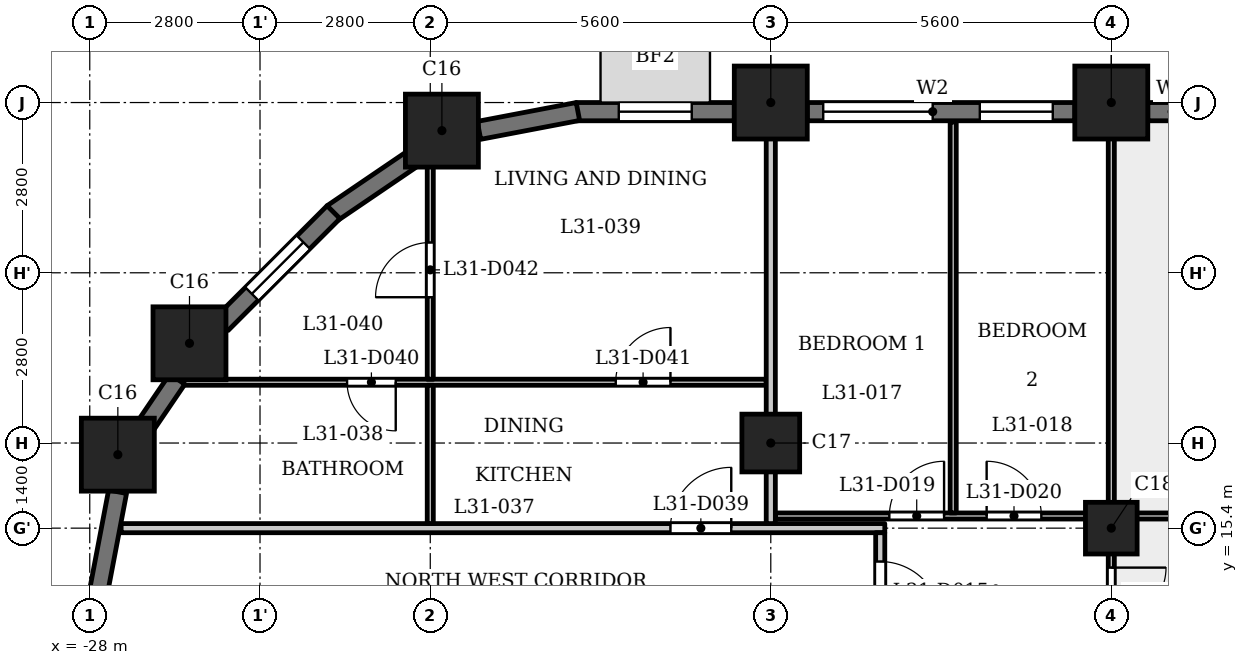
"""IFC4 building model, lengths in metres.
Left out: names, types, materials, properties, quantities, classifications, styles, units other than length and angle.
Written with IfcOpenShell. Run it as: python <this file> out.ifc"""

import sys

from ifc_helpers import new_model, si_unit, direction, frame, frame_2d, origin, origin_2d, place, context, subcontext, project, spatial, rectangle, extrude, element, fill, save


model = new_model("IFC4")
c1 = context("Model", 3, precision=1e-05, world=origin(), true_north=direction((0.0, 1.0)))
c2 = subcontext(c1, "Body", "Model", "MODEL_VIEW")
j1 = project(units=[si_unit("LENGTHUNIT", "METRE"), si_unit("PLANEANGLEUNIT", "RADIAN")], contexts=[c1])
p1 = place(None, origin())
s1 = spatial("IfcSite", under=j1, at=p1, CompositionType="ELEMENT")
p2 = place(p1, origin())
s2 = spatial("IfcBuilding", under=s1, at=p2, CompositionType="ELEMENT")
p3 = place(p2, frame((0.0, 0.0, 121.8)))
s3 = spatial("IfcBuildingStorey", under=s2, at=p3, CompositionType="ELEMENT", Elevation=121.8)
for number, where, z_axis, x_axis in (
    (1, (-11.2, 22.4, 0.0), (0.0, 0.0, 1.0), (1.0, 0.0, 0.0)),
    (2, (-16.8, 22.4, 0.0), (0.0, 0.0, 1.0), (1.0, 0.0, 0.0)),
    (3, (-22.209, 21.938, 0.0), (0.0, 0.0, 1.0), (1.0, 0.0, 0.0)),
    (4, (-26.36, 18.44, 0.0), (0.0, 0.0, 1.0), (1.0, 0.0, 0.0)),
    (5, (-27.538, 16.609, 0.0), (0.0, 0.0, 1.0), (1.0, 0.0, 0.0)),
):
    element("IfcColumn", number, at=place(p3, frame(where, z_axis=z_axis, x_axis=x_axis)), inside=s3, PredefinedType="COLUMN", context=c2, shape_type="SweptSolid", body=[
        extrude(rectangle(XDim=1.2, YDim=1.2, at=origin_2d()), origin(), (0.0, 0.0, 1.0), 3.5),
    ])
p4 = place(p3, frame((-16.8, 16.8, 0.0), z_axis=(0.0, 0.0, 1.0), x_axis=(1.0, 0.0, 0.0)))
e6 = element("IfcColumn", 6, at=p4, inside=s3, PredefinedType="COLUMN", context=c2, shape_type="SweptSolid", body=[
    extrude(rectangle(XDim=0.95, YDim=0.95, at=origin_2d()), origin(), (0.0, 0.0, 1.0), 3.5),
])
p5 = place(p3, frame((-11.2, 15.4, 0.0), z_axis=(0.0, 0.0, 1.0), x_axis=(1.0, 0.0, 0.0)))
e7 = element("IfcColumn", 7, at=p5, inside=s3, PredefinedType="COLUMN", context=c2, shape_type="SweptSolid", body=[
    extrude(rectangle(XDim=0.85, YDim=0.85, at=origin_2d()), origin(), (0.0, 0.0, 1.0), 3.5),
])
p6 = place(p3, frame((-6.2, 22.25, 0.0), z_axis=(0.0, 0.0, 1.0), x_axis=(-1.0, 0.0, 0.0)))
e8 = element("IfcWall", 8, at=p6, inside=s3, PredefinedType="SOLIDWALL", context=c2, shape_type="SweptSolid", body=[
    extrude(rectangle(XDim=4.4, YDim=0.3, at=frame_2d((2.2, 0.0))), origin(), (0.0, 0.0, 1.0), 2.35),
])
p7 = place(p6, frame((0.4, 0.0, 1.2)))
e9 = element("IfcOpeningElement", 9, at=p7, cuts=e8, PredefinedType="OPENING", context=c2, shape_type="SweptSolid", body=[
    extrude(rectangle(XDim=3.6, YDim=0.95, at=frame_2d((1.8, 0.475))), frame((0.0, 0.16, 0.0), z_axis=(0.0, -1.0, 0.0), x_axis=(1.0, 0.0, 0.0)), (0.0, 0.0, 1.0), 0.32),
])
p8 = place(p3, frame((-11.8, 22.25, 0.0), z_axis=(0.0, 0.0, 1.0), x_axis=(-1.0, 0.0, 0.0)))
e10 = element("IfcWall", 10, at=p8, inside=s3, PredefinedType="SOLIDWALL", context=c2, shape_type="SweptSolid", body=[
    extrude(rectangle(XDim=4.4, YDim=0.3, at=frame_2d((2.2, 0.0))), origin(), (0.0, 0.0, 1.0), 2.35),
])
p9 = place(p8, frame((0.363, 0.0, 0.6)))
e11 = element("IfcOpeningElement", 11, at=p9, cuts=e10, PredefinedType="OPENING", context=c2, shape_type="SweptSolid", body=[
    extrude(rectangle(XDim=1.2, YDim=1.55, at=frame_2d((0.6, 0.775))), frame((0.0, 0.16, 0.0), z_axis=(0.0, -1.0, 0.0), x_axis=(1.0, 0.0, 0.0)), (0.0, 0.0, 1.0), 0.32),
])
p10 = place(p8, frame((2.337, 0.0, 0.9)))
e12 = element("IfcOpeningElement", 12, at=p10, cuts=e10, PredefinedType="OPENING", context=c2, shape_type="SweptSolid", body=[
    extrude(rectangle(XDim=1.8, YDim=1.25, at=frame_2d((0.9, 0.625))), frame((0.0, 0.16, 0.0), z_axis=(0.0, -1.0, 0.0), x_axis=(1.0, 0.0, 0.0)), (0.0, 0.0, 1.0), 0.32),
])
p11 = place(p3, frame((-17.4, 22.25, 0.0), z_axis=(0.0, 0.0, 1.0), x_axis=(-1.0, 0.0, 0.0)))
e13 = element("IfcWall", 13, at=p11, inside=s3, PredefinedType="SOLIDWALL", context=c2, shape_type="SweptSolid", body=[
    extrude(rectangle(XDim=2.6, YDim=0.3, at=frame_2d((1.3, 0.0))), origin(), (0.0, 0.0, 1.0), 2.35),
])
p12 = place(p11, frame((0.7, 0.0, 0.6)))
e14 = element("IfcOpeningElement", 14, at=p12, cuts=e13, PredefinedType="OPENING", context=c2, shape_type="SweptSolid", body=[
    extrude(rectangle(XDim=1.2, YDim=1.55, at=frame_2d((0.6, 0.775))), frame((0.0, 0.16, 0.0), z_axis=(0.0, -1.0, 0.0), x_axis=(1.0, 0.0, 0.0)), (0.0, 0.0, 1.0), 0.32),
])
for number, where, z_axis, x_axis in (
    (15, (-19.972, 22.253, 0.0), (0.0, 0.0, 1.0), (-0.982, -0.187, 0.0)),
    (16, (-22.643, 21.51, 0.0), (0.0, 0.0, 1.0), (-0.827, -0.562, 0.0)),
):
    element("IfcWall", number, at=place(p3, frame(where, z_axis=z_axis, x_axis=x_axis)), inside=s3, PredefinedType="SOLIDWALL", context=c2, shape_type="SweptSolid", body=[
        extrude(rectangle(XDim=1.656, YDim=0.3, at=frame_2d((0.828, 0.0))), origin(), (0.0, 0.0, 1.0), 2.35),
    ])
p13 = place(p3, frame((-23.991, 20.597, 0.0), z_axis=(0.0, 0.0, 1.0), x_axis=(-0.707106781187, -0.707106781187, 0.0)))
e17 = element("IfcWall", 17, at=p13, inside=s3, PredefinedType="SOLIDWALL", context=c2, shape_type="SweptSolid", body=[
    extrude(rectangle(XDim=2.6, YDim=0.3, at=frame_2d((1.3, 0.0))), origin(), (0.0, 0.0, 1.0), 2.35),
])
p14 = place(p13, frame((0.7, 0.0, 0.6)))
e18 = element("IfcOpeningElement", 18, at=p14, cuts=e17, PredefinedType="OPENING", context=c2, shape_type="SweptSolid", body=[
    extrude(rectangle(XDim=1.2, YDim=1.55, at=frame_2d((0.6, 0.775))), frame((0.0, 0.16, 0.0), z_axis=(0.0, -1.0, 0.0), x_axis=(1.0, 0.0, 0.0)), (0.0, 0.0, 1.0), 0.32),
])
p15 = place(p3, frame((-26.561, 17.851, 0.0), z_axis=(0.0, 0.0, 1.0), x_axis=(-0.562173331661, -0.827019434577, 0.0)))
e19 = element("IfcWall", 19, at=p15, inside=s3, PredefinedType="SOLIDWALL", context=c2, shape_type="SweptSolid", body=[
    extrude(rectangle(XDim=0.977, YDim=0.3, at=frame_2d((0.489, 0.0))), origin(), (0.0, 0.0, 1.0), 3.15),
])
p16 = place(p3, frame((-27.542, 15.999, 0.0), z_axis=(0.0, 0.0, 1.0), x_axis=(-0.187349172861, -0.982293381546, 0.0)))
e20 = element("IfcWall", 20, at=p16, inside=s3, PredefinedType="SOLIDWALL", context=c2, shape_type="SweptSolid", body=[
    extrude(rectangle(XDim=1.656, YDim=0.3, at=frame_2d((0.828, 0.0))), origin(), (0.0, 0.0, 1.0), 2.35),
])
p17 = place(p3, frame((-27.484, 15.4, 0.0), z_axis=(0.0, 0.0, 1.0), x_axis=(1.0, 0.0, 0.0)))
e21 = element("IfcWall", 21, at=p17, inside=s3, PredefinedType="PARTITIONING", context=c2, shape_type="SweptSolid", body=[
    extrude(rectangle(XDim=12.559, YDim=0.15, at=frame_2d((6.279, 0.0))), origin(), (0.0, 0.0, 1.0), 3.15),
])
p18 = place(p17, frame((9.034, 0.0, 0.0)))
e22 = element("IfcOpeningElement", 22, at=p18, cuts=e21, PredefinedType="OPENING", context=c2, shape_type="SweptSolid", body=[
    extrude(rectangle(XDim=1.0, YDim=2.1, at=frame_2d((0.5, 1.05))), frame((0.0, 0.085, 0.0), z_axis=(0.0, -1.0, 0.0), x_axis=(1.0, 0.0, 0.0)), (0.0, 0.0, 1.0), 0.17),
])
p19 = place(p3, frame((-16.725, 15.6, 0.0), z_axis=(0.0, 0.0, 1.0), x_axis=(1.0, 0.0, 0.0)))
e23 = element("IfcWall", 23, at=p19, inside=s3, PredefinedType="PARTITIONING", context=c2, shape_type="SweptSolid", body=[
    extrude(rectangle(XDim=33.45, YDim=0.1, at=frame_2d((16.725, 0.0))), origin(), (0.0, 0.0, 1.0), 3.15),
])
p20 = place(p19, frame((9.425, 0.0, 0.0)))
e24 = element("IfcOpeningElement", 24, at=p20, cuts=e23, PredefinedType="OPENING", context=c2, shape_type="SweptSolid", body=[
    extrude(rectangle(XDim=0.8, YDim=2.1, at=frame_2d((0.4, 1.05))), frame((0.0, 0.06, 0.0), z_axis=(0.0, -1.0, 0.0), x_axis=(1.0, 0.0, 0.0)), (0.0, 0.0, 1.0), 0.12),
])
p21 = place(p19, frame((6.975, 0.0, 0.0)))
e25 = element("IfcOpeningElement", 25, at=p21, cuts=e23, PredefinedType="OPENING", context=c2, shape_type="SweptSolid", body=[
    extrude(rectangle(XDim=0.9, YDim=2.1, at=frame_2d((0.45, 1.05))), frame((0.0, 0.06, 0.0), z_axis=(0.0, -1.0, 0.0), x_axis=(1.0, 0.0, 0.0)), (0.0, 0.0, 1.0), 0.12),
])
p22 = place(p19, frame((1.875, 0.0, 0.0)))
e26 = element("IfcOpeningElement", 26, at=p22, cuts=e23, PredefinedType="OPENING", context=c2, shape_type="SweptSolid", body=[
    extrude(rectangle(XDim=0.9, YDim=2.1, at=frame_2d((0.45, 1.05))), frame((0.0, 0.06, 0.0), z_axis=(0.0, -1.0, 0.0), x_axis=(1.0, 0.0, 0.0)), (0.0, 0.0, 1.0), 0.12),
])
p23 = place(p19, frame((3.475, 0.0, 0.0)))
e27 = element("IfcOpeningElement", 27, at=p23, cuts=e23, PredefinedType="OPENING", context=c2, shape_type="SweptSolid", body=[
    extrude(rectangle(XDim=0.9, YDim=2.1, at=frame_2d((0.45, 1.05))), frame((0.0, 0.06, 0.0), z_axis=(0.0, -1.0, 0.0), x_axis=(1.0, 0.0, 0.0)), (0.0, 0.0, 1.0), 0.12),
])
p24 = place(p19, frame((11.775, 0.0, 0.0)))
e28 = element("IfcOpeningElement", 28, at=p24, cuts=e23, PredefinedType="OPENING", context=c2, shape_type="SweptSolid", body=[
    extrude(rectangle(XDim=0.8, YDim=2.1, at=frame_2d((0.4, 1.05))), frame((0.0, 0.06, 0.0), z_axis=(0.0, -1.0, 0.0), x_axis=(1.0, 0.0, 0.0)), (0.0, 0.0, 1.0), 0.12),
])
p25 = place(p19, frame((14.175, 0.0, 0.0)))
e29 = element("IfcOpeningElement", 29, at=p25, cuts=e23, PredefinedType="OPENING", context=c2, shape_type="SweptSolid", body=[
    extrude(rectangle(XDim=0.9, YDim=2.1, at=frame_2d((0.45, 1.05))), frame((0.0, 0.06, 0.0), z_axis=(0.0, -1.0, 0.0), x_axis=(1.0, 0.0, 0.0)), (0.0, 0.0, 1.0), 0.12),
])
p26 = place(p19, frame((20.725, 0.0, 0.0)))
e30 = element("IfcOpeningElement", 30, at=p26, cuts=e23, PredefinedType="OPENING", context=c2, shape_type="SweptSolid", body=[
    extrude(rectangle(XDim=0.8, YDim=2.1, at=frame_2d((0.4, 1.05))), frame((0.0, 0.06, 0.0), z_axis=(0.0, -1.0, 0.0), x_axis=(1.0, 0.0, 0.0)), (0.0, 0.0, 1.0), 0.12),
])
p27 = place(p19, frame((18.375, 0.0, 0.0)))
e31 = element("IfcOpeningElement", 31, at=p27, cuts=e23, PredefinedType="OPENING", context=c2, shape_type="SweptSolid", body=[
    extrude(rectangle(XDim=0.9, YDim=2.1, at=frame_2d((0.45, 1.05))), frame((0.0, 0.06, 0.0), z_axis=(0.0, -1.0, 0.0), x_axis=(1.0, 0.0, 0.0)), (0.0, 0.0, 1.0), 0.12),
])
p28 = place(p19, frame((26.425, 0.0, 0.0)))
e32 = element("IfcOpeningElement", 32, at=p28, cuts=e23, PredefinedType="OPENING", context=c2, shape_type="SweptSolid", body=[
    extrude(rectangle(XDim=0.8, YDim=2.1, at=frame_2d((0.4, 1.05))), frame((0.0, 0.06, 0.0), z_axis=(0.0, -1.0, 0.0), x_axis=(1.0, 0.0, 0.0)), (0.0, 0.0, 1.0), 0.12),
])
p29 = place(p19, frame((23.875, 0.0, 0.0)))
e33 = element("IfcOpeningElement", 33, at=p29, cuts=e23, PredefinedType="OPENING", context=c2, shape_type="SweptSolid", body=[
    extrude(rectangle(XDim=0.9, YDim=2.1, at=frame_2d((0.45, 1.05))), frame((0.0, 0.06, 0.0), z_axis=(0.0, -1.0, 0.0), x_axis=(1.0, 0.0, 0.0)), (0.0, 0.0, 1.0), 0.12),
])
p30 = place(p19, frame((28.575, 0.0, 0.0)))
e34 = element("IfcOpeningElement", 34, at=p30, cuts=e23, PredefinedType="OPENING", context=c2, shape_type="SweptSolid", body=[
    extrude(rectangle(XDim=0.8, YDim=2.1, at=frame_2d((0.4, 1.05))), frame((0.0, 0.06, 0.0), z_axis=(0.0, -1.0, 0.0), x_axis=(1.0, 0.0, 0.0)), (0.0, 0.0, 1.0), 0.12),
])
p31 = place(p19, frame((30.725, 0.0, 0.0)))
e35 = element("IfcOpeningElement", 35, at=p31, cuts=e23, PredefinedType="OPENING", context=c2, shape_type="SweptSolid", body=[
    extrude(rectangle(XDim=0.9, YDim=2.1, at=frame_2d((0.45, 1.05))), frame((0.0, 0.06, 0.0), z_axis=(0.0, -1.0, 0.0), x_axis=(1.0, 0.0, 0.0)), (0.0, 0.0, 1.0), 0.12),
])
p32 = place(p3, frame((-26.465, 17.8, 0.0), z_axis=(0.0, 0.0, 1.0), x_axis=(1.0, 0.0, 0.0)))
e36 = element("IfcWall", 36, at=p32, inside=s3, PredefinedType="PARTITIONING", context=c2, shape_type="SweptSolid", body=[
    extrude(rectangle(XDim=9.59, YDim=0.1, at=frame_2d((4.795, 0.0))), origin(), (0.0, 0.0, 1.0), 3.15),
])
p33 = place(p32, frame((2.697, 0.0, 0.0)))
e37 = element("IfcOpeningElement", 37, at=p33, cuts=e36, PredefinedType="OPENING", context=c2, shape_type="SweptSolid", body=[
    extrude(rectangle(XDim=0.8, YDim=2.1, at=frame_2d((0.4, 1.05))), frame((0.0, 0.06, 0.0), z_axis=(0.0, -1.0, 0.0), x_axis=(1.0, 0.0, 0.0)), (0.0, 0.0, 1.0), 0.12),
])
p34 = place(p32, frame((7.115, 0.0, 0.0)))
e38 = element("IfcOpeningElement", 38, at=p34, cuts=e36, PredefinedType="OPENING", context=c2, shape_type="SweptSolid", body=[
    extrude(rectangle(XDim=0.9, YDim=2.1, at=frame_2d((0.45, 1.05))), frame((0.0, 0.06, 0.0), z_axis=(0.0, -1.0, 0.0), x_axis=(1.0, 0.0, 0.0)), (0.0, 0.0, 1.0), 0.12),
])
p35 = place(p3, frame((-22.4, 15.475, 0.0), z_axis=(0.0, 0.0, 1.0), x_axis=(0.0, 1.0, 0.0)))
e39 = element("IfcWall", 39, at=p35, inside=s3, PredefinedType="PARTITIONING", context=c2, shape_type="SweptSolid", body=[
    extrude(rectangle(XDim=2.275, YDim=0.1, at=frame_2d((1.137, 0.0))), origin(), (0.0, 0.0, 1.0), 3.15),
])
p36 = place(p3, frame((-22.4, 17.85, 0.0), z_axis=(0.0, 0.0, 1.0), x_axis=(0.0, 1.0, 0.0)))
e40 = element("IfcWall", 40, at=p36, inside=s3, PredefinedType="PARTITIONING", context=c2, shape_type="SweptSolid", body=[
    extrude(rectangle(XDim=3.87, YDim=0.1, at=frame_2d((1.935, 0.0))), origin(), (0.0, 0.0, 1.0), 3.15),
])
p37 = place(p36, frame((1.348, 0.0, 0.0)))
e41 = element("IfcOpeningElement", 41, at=p37, cuts=e40, PredefinedType="OPENING", context=c2, shape_type="SweptSolid", body=[
    extrude(rectangle(XDim=0.9, YDim=2.1, at=frame_2d((0.45, 1.05))), frame((0.0, 0.06, 0.0), z_axis=(0.0, -1.0, 0.0), x_axis=(1.0, 0.0, 0.0)), (0.0, 0.0, 1.0), 0.12),
])
p38 = place(p3, frame((-16.8, 15.475, 0.0), z_axis=(0.0, 0.0, 1.0), x_axis=(0.0, 1.0, 0.0)))
e42 = element("IfcWall", 42, at=p38, inside=s3, PredefinedType="PARTITIONING", context=c2, shape_type="SweptSolid", body=[
    extrude(rectangle(XDim=7.505, YDim=0.15, at=frame_2d((3.752, 0.0))), origin(), (0.0, 0.0, 1.0), 3.15),
])
p39 = place(p3, frame((-15.0, 13.275, 0.0), z_axis=(0.0, 0.0, 1.0), x_axis=(0.0, 1.0, 0.0)))
e43 = element("IfcWall", 43, at=p39, inside=s3, PredefinedType="PARTITIONING", context=c2, shape_type="SweptSolid", body=[
    extrude(rectangle(XDim=2.05, YDim=0.15, at=frame_2d((1.025, 0.0))), origin(), (0.0, 0.0, 1.0), 3.15),
])
p40 = place(p39, frame((0.576, 0.0, 0.0)))
e44 = element("IfcOpeningElement", 44, at=p40, cuts=e43, PredefinedType="OPENING", context=c2, shape_type="SweptSolid", body=[
    extrude(rectangle(XDim=1.0, YDim=2.1, at=frame_2d((0.5, 1.05))), frame((0.0, 0.085, 0.0), z_axis=(0.0, -1.0, 0.0), x_axis=(1.0, 0.0, 0.0)), (0.0, 0.0, 1.0), 0.17),
])
p41 = place(p3, frame((-13.8, 15.65, 0.0), z_axis=(0.0, 0.0, 1.0), x_axis=(0.0, 1.0, 0.0)))
e45 = element("IfcWall", 45, at=p41, inside=s3, PredefinedType="PARTITIONING", context=c2, shape_type="SweptSolid", body=[
    extrude(rectangle(XDim=6.43, YDim=0.1, at=frame_2d((3.215, 0.0))), origin(), (0.0, 0.0, 1.0), 3.15),
])
p42 = place(p3, frame((-11.2, 13.275, 0.0), z_axis=(0.0, 0.0, 1.0), x_axis=(0.0, 1.0, 0.0)))
e46 = element("IfcWall", 46, at=p42, inside=s3, PredefinedType="PARTITIONING", context=c2, shape_type="SweptSolid", body=[
    extrude(rectangle(XDim=2.275, YDim=0.1, at=frame_2d((1.138, 0.0))), origin(), (0.0, 0.0, 1.0), 3.15),
])
p43 = place(p42, frame((0.576, 0.0, 0.0)))
e47 = element("IfcOpeningElement", 47, at=p43, cuts=e46, PredefinedType="OPENING", context=c2, shape_type="SweptSolid", body=[
    extrude(rectangle(XDim=0.9, YDim=2.1, at=frame_2d((0.45, 1.05))), frame((0.0, 0.06, 0.0), z_axis=(0.0, -1.0, 0.0), x_axis=(1.0, 0.0, 0.0)), (0.0, 0.0, 1.0), 0.12),
])
p44 = place(p3, frame((-11.2, 15.65, 0.0), z_axis=(0.0, 0.0, 1.0), x_axis=(0.0, 1.0, 0.0)))
e48 = element("IfcWall", 48, at=p44, inside=s3, PredefinedType="PARTITIONING", context=c2, shape_type="SweptSolid", body=[
    extrude(rectangle(XDim=7.33, YDim=0.1, at=frame_2d((3.665, 0.0))), origin(), (0.0, 0.0, 1.0), 3.15),
])
p45 = place(p40, origin())
e49 = element("IfcDoor", 49, at=p45, inside=s3, OperationType="SINGLE_SWING_LEFT", PredefinedType="DOOR", context=c2, shape_type="SweptSolid", body=[
    extrude(rectangle(XDim=1.0, YDim=2.1, at=frame_2d((0.5, 1.05))), frame((0.0, 0.025, 0.0), z_axis=(0.0, -1.0, 0.0), x_axis=(1.0, 0.0, 0.0)), (0.0, 0.0, 1.0), 0.05),
])
fill(e44, e49)
p46 = place(p43, origin())
e50 = element("IfcDoor", 50, at=p46, inside=s3, OperationType="SINGLE_SWING_RIGHT", PredefinedType="DOOR", context=c2, shape_type="SweptSolid", body=[
    extrude(rectangle(XDim=0.9, YDim=2.1, at=frame_2d((0.45, 1.05))), frame((0.0, 0.025, 0.0), z_axis=(0.0, -1.0, 0.0), x_axis=(1.0, 0.0, 0.0)), (0.0, 0.0, 1.0), 0.05),
])
fill(e47, e50)
p47 = place(p22, origin())
e51 = element("IfcDoor", 51, at=p47, inside=s3, OperationType="SINGLE_SWING_LEFT", PredefinedType="DOOR", context=c2, shape_type="SweptSolid", body=[
    extrude(rectangle(XDim=0.9, YDim=2.1, at=frame_2d((0.45, 1.05))), frame((0.0, 0.025, 0.0), z_axis=(0.0, -1.0, 0.0), x_axis=(1.0, 0.0, 0.0)), (0.0, 0.0, 1.0), 0.05),
])
fill(e26, e51)
p48 = place(p23, origin())
e52 = element("IfcDoor", 52, at=p48, inside=s3, OperationType="SINGLE_SWING_RIGHT", PredefinedType="DOOR", context=c2, shape_type="SweptSolid", body=[
    extrude(rectangle(XDim=0.9, YDim=2.1, at=frame_2d((0.45, 1.05))), frame((0.0, 0.025, 0.0), z_axis=(0.0, -1.0, 0.0), x_axis=(1.0, 0.0, 0.0)), (0.0, 0.0, 1.0), 0.05),
])
fill(e27, e52)
p49 = place(p18, origin())
e53 = element("IfcDoor", 53, at=p49, inside=s3, OperationType="SINGLE_SWING_LEFT", PredefinedType="DOOR", context=c2, shape_type="SweptSolid", body=[
    extrude(rectangle(XDim=1.0, YDim=2.1, at=frame_2d((0.5, 1.05))), frame((0.0, 0.025, 0.0), z_axis=(0.0, -1.0, 0.0), x_axis=(1.0, 0.0, 0.0)), (0.0, 0.0, 1.0), 0.05),
])
fill(e22, e53)
p50 = place(p33, origin())
e54 = element("IfcDoor", 54, at=p50, inside=s3, OperationType="SINGLE_SWING_RIGHT", PredefinedType="DOOR", context=c2, shape_type="SweptSolid", body=[
    extrude(rectangle(XDim=0.8, YDim=2.1, at=frame_2d((0.4, 1.05))), frame((0.0, 0.025, 0.0), z_axis=(0.0, -1.0, 0.0), x_axis=(1.0, 0.0, 0.0)), (0.0, 0.0, 1.0), 0.05),
])
fill(e37, e54)
p51 = place(p34, origin())
e55 = element("IfcDoor", 55, at=p51, inside=s3, OperationType="SINGLE_SWING_LEFT", PredefinedType="DOOR", context=c2, shape_type="SweptSolid", body=[
    extrude(rectangle(XDim=0.9, YDim=2.1, at=frame_2d((0.45, 1.05))), frame((0.0, 0.025, 0.0), z_axis=(0.0, -1.0, 0.0), x_axis=(1.0, 0.0, 0.0)), (0.0, 0.0, 1.0), 0.05),
])
fill(e38, e55)
p52 = place(p37, origin())
e56 = element("IfcDoor", 56, at=p52, inside=s3, OperationType="SINGLE_SWING_RIGHT", PredefinedType="DOOR", context=c2, shape_type="SweptSolid", body=[
    extrude(rectangle(XDim=0.9, YDim=2.1, at=frame_2d((0.45, 1.05))), frame((0.0, 0.025, 0.0), z_axis=(0.0, -1.0, 0.0), x_axis=(1.0, 0.0, 0.0)), (0.0, 0.0, 1.0), 0.05),
])
fill(e41, e56)
p53 = place(p9, origin())
e57 = element("IfcWindow", 57, at=p53, inside=s3, PartitioningType="SINGLE_PANEL", PredefinedType="WINDOW", context=c2, shape_type="SweptSolid", body=[
    extrude(rectangle(XDim=1.2, YDim=1.55, at=frame_2d((0.6, 0.775))), frame((0.0, 0.03, 0.0), z_axis=(0.0, -1.0, 0.0), x_axis=(1.0, 0.0, 0.0)), (0.0, 0.0, 1.0), 0.06),
])
fill(e11, e57)
p54 = place(p10, origin())
e58 = element("IfcWindow", 58, at=p54, inside=s3, PartitioningType="SINGLE_PANEL", PredefinedType="WINDOW", context=c2, shape_type="SweptSolid", body=[
    extrude(rectangle(XDim=1.8, YDim=1.25, at=frame_2d((0.9, 0.625))), frame((0.0, 0.03, 0.0), z_axis=(0.0, -1.0, 0.0), x_axis=(1.0, 0.0, 0.0)), (0.0, 0.0, 1.0), 0.06),
])
fill(e12, e58)
p55 = place(p12, origin())
e59 = element("IfcWindow", 59, at=p55, inside=s3, PartitioningType="SINGLE_PANEL", PredefinedType="WINDOW", context=c2, shape_type="SweptSolid", body=[
    extrude(rectangle(XDim=1.2, YDim=1.55, at=frame_2d((0.6, 0.775))), frame((0.0, 0.03, 0.0), z_axis=(0.0, -1.0, 0.0), x_axis=(1.0, 0.0, 0.0)), (0.0, 0.0, 1.0), 0.06),
])
fill(e14, e59)
p56 = place(p14, origin())
e60 = element("IfcWindow", 60, at=p56, inside=s3, PartitioningType="SINGLE_PANEL", PredefinedType="WINDOW", context=c2, shape_type="SweptSolid", body=[
    extrude(rectangle(XDim=1.2, YDim=1.55, at=frame_2d((0.6, 0.775))), frame((0.0, 0.03, 0.0), z_axis=(0.0, -1.0, 0.0), x_axis=(1.0, 0.0, 0.0)), (0.0, 0.0, 1.0), 0.06),
])
fill(e18, e60)
save(model, sys.argv[1])
